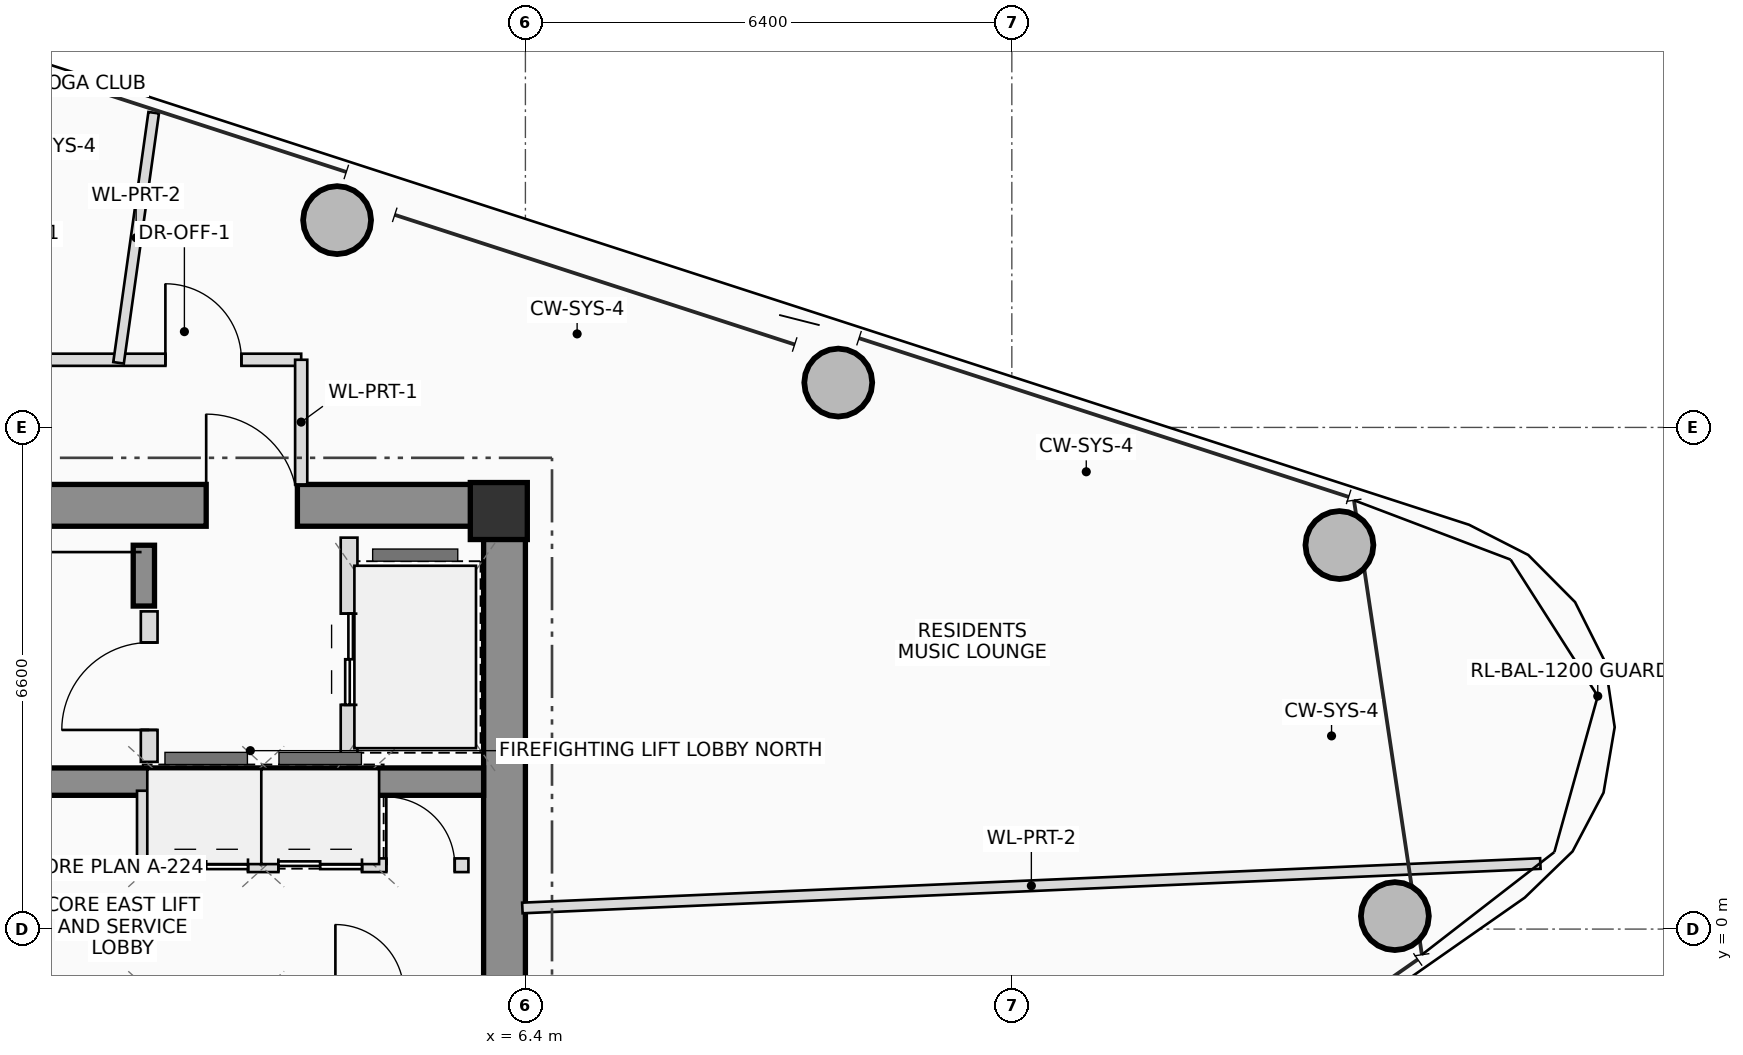
"""IFC4 building model, lengths in metres.
Left out: names, types, materials, properties, quantities, classifications, styles, units other than length and angle.
Written with IfcOpenShell. Run it as: python <this file> out.ifc"""

import sys

from ifc_helpers import new_model, si_unit, direction, frame, frame_2d, origin, origin_2d, place, context, subcontext, project, spatial, rectangle, hollow_circle, extrude, source, transform, mapped, element, fill, save


model = new_model("IFC4")
c1 = context("Model", 3, precision=1e-05, world=origin(), true_north=direction((0.0, 1.0)))
c2 = subcontext(c1, "Body", "Model", "MODEL_VIEW")
j1 = project(units=[si_unit("LENGTHUNIT", "METRE"), si_unit("PLANEANGLEUNIT", "RADIAN")], contexts=[c1])
p1 = place(None, origin())
s1 = spatial("IfcSite", under=j1, at=p1, CompositionType="ELEMENT")
p2 = place(p1, origin())
s2 = spatial("IfcBuilding", under=s1, at=p2, CompositionType="ELEMENT")
p3 = place(p2, frame((0.0, 0.0, 257.55)))
s3 = spatial("IfcBuildingStorey", under=s2, at=p3, CompositionType="ELEMENT", Elevation=257.55)
m1 = source(origin(), c2, "Body", "SweptSolid", [
    extrude(rectangle(XDim=0.75, YDim=0.75, at=origin_2d()), origin(), (0.0, 0.0, 1.0), 3.4),
])
p4 = place(p3, frame((6.05, 5.5, 0.0), z_axis=(0.0, 0.0, 1.0), x_axis=(1.0, 0.0, 0.0)))
e1 = element("IfcColumn", 1, at=p4, inside=s3, PredefinedType="COLUMN", context=c2, shape_type="MappedRepresentation", body=[
    mapped(m1, transform((0.0, 0.0, 0.0), scale=1.0)),
])
p5 = place(p3, frame((-6.4, 5.575, 0.0), z_axis=(0.0, 0.0, 1.0), x_axis=(1.0, 0.0, 0.0)))
e2 = element("IfcWall", 2, at=p5, inside=s3, PredefinedType="SHEAR", context=c2, shape_type="SweptSolid", body=[
    extrude(rectangle(XDim=12.8, YDim=0.55, at=frame_2d((6.4, 0.0))), origin(), (0.0, 0.0, 1.0), 3.4),
])
p6 = place(p5, frame((8.6, 0.0, 0.0)))
e3 = element("IfcOpeningElement", 3, at=p6, cuts=e2, PredefinedType="OPENING", context=c2, shape_type="SweptSolid", body=[
    extrude(rectangle(XDim=1.2, YDim=2.2, at=frame_2d((0.6, 1.1))), frame((0.0, 0.285, 0.0), z_axis=(0.0, -1.0, 0.0), x_axis=(1.0, 0.0, 0.0)), (0.0, 0.0, 1.0), 0.57),
])
p7 = place(p3, frame((6.125, -5.3, 0.0), z_axis=(0.0, 0.0, 1.0), x_axis=(0.0, 1.0, 0.0)))
e4 = element("IfcWall", 4, at=p7, inside=s3, PredefinedType="SHEAR", context=c2, shape_type="SweptSolid", body=[
    extrude(rectangle(XDim=10.6, YDim=0.55, at=frame_2d((5.3, 0.0))), origin(), (0.0, 0.0, 1.0), 3.4),
])
p8 = place(p3, frame((-5.85, 1.94, 0.0), z_axis=(0.0, 0.0, 1.0), x_axis=(1.0, 0.0, 0.0)))
e5 = element("IfcWall", 5, at=p8, inside=s3, PredefinedType="SHEAR", context=c2, shape_type="SweptSolid", body=[
    extrude(rectangle(XDim=11.7, YDim=0.36, at=frame_2d((5.85, 0.0))), origin(), (0.0, 0.0, 1.0), 3.4),
])
p9 = place(p3, frame((1.38, 4.25, 0.0), z_axis=(0.0, 0.0, 1.0), x_axis=(0.0, 1.0, 0.0)))
e6 = element("IfcWall", 6, at=p9, inside=s3, PredefinedType="SHEAR", context=c2, shape_type="SweptSolid", body=[
    extrude(rectangle(XDim=0.8, YDim=0.28, at=frame_2d((0.4, 0.0))), origin(), (0.0, 0.0, 1.0), 3.4),
])
m2 = source(origin(), c2, "Body", "SweptSolid", [
    extrude(hollow_circle(Radius=0.45, WallThickness=0.032, at=origin_2d()), origin(), (0.0, 0.0, 1.0), 3.4),
])
for number, where, z_axis, x_axis in (
    (7, (17.84, 0.171, 0.0), (0.0, 0.0, 1.0), (1.0, 0.0, 0.0)),
    (8, (17.11, 5.052, 0.0), (0.0, 0.0, 1.0), (1.0, 0.0, 0.0)),
    (9, (10.516, 7.19, 0.0), (0.0, 0.0, 1.0), (1.0, 0.0, 0.0)),
    (10, (3.922, 9.327, 0.0), (0.0, 0.0, 1.0), (1.0, 0.0, 0.0)),
):
    element("IfcColumn", number, at=place(p3, frame(where, z_axis=z_axis, x_axis=x_axis)), inside=s3, PredefinedType="COLUMN", context=c2, shape_type="MappedRepresentation", body=[
        mapped(m2, transform((0.0, 0.0, 0.0), scale=1.0)),
    ])
p10 = place(p3, frame((1.45, 2.2, 0.0), z_axis=(0.0, 0.0, 1.0), x_axis=(0.0, 1.0, 0.0)))
e11 = element("IfcWall", 11, at=p10, inside=s3, PredefinedType="PLUMBINGWALL", context=c2, shape_type="SweptSolid", body=[
    extrude(rectangle(XDim=1.98, YDim=0.22, at=frame_2d((0.99, 0.0))), origin(), (0.0, 0.0, 1.0), 3.2),
])
p11 = place(p10, frame((0.42, 0.0, 0.0)))
e12 = element("IfcOpeningElement", 12, at=p11, cuts=e11, PredefinedType="OPENING", context=c2, shape_type="SweptSolid", body=[
    extrude(rectangle(XDim=1.15, YDim=2.15, at=frame_2d((0.575, 1.075))), frame((0.0, 0.12, 0.0), z_axis=(0.0, -1.0, 0.0), x_axis=(1.0, 0.0, 0.0)), (0.0, 0.0, 1.0), 0.24),
])
p12 = place(p3, frame((4.08, 2.2, 0.0), z_axis=(0.0, 0.0, 1.0), x_axis=(0.0, 1.0, 0.0)))
e13 = element("IfcWall", 13, at=p12, inside=s3, PredefinedType="PLUMBINGWALL", context=c2, shape_type="SweptSolid", body=[
    extrude(rectangle(XDim=2.95, YDim=0.22, at=frame_2d((1.475, 0.0))), origin(), (0.0, 0.0, 1.0), 3.2),
])
p13 = place(p12, frame((0.75, 0.0, 0.0)))
e14 = element("IfcOpeningElement", 14, at=p13, cuts=e13, PredefinedType="OPENING", context=c2, shape_type="SweptSolid", body=[
    extrude(rectangle(XDim=1.2, YDim=2.25, at=frame_2d((0.6, 1.125))), frame((0.0, 0.12, 0.0), z_axis=(0.0, -1.0, 0.0), x_axis=(1.0, 0.0, 0.0)), (0.0, 0.0, 1.0), 0.24),
])
for number, where, z_axis, x_axis in (
    (15, (1.38, 0.84, 0.0), (0.0, 0.0, 1.0), (0.0, 1.0, 0.0)),
    (16, (3.02, 0.84, 0.0), (0.0, 0.0, 1.0), (0.0, 1.0, 0.0)),
    (17, (4.38, 0.84, 0.0), (0.0, 0.0, 1.0), (0.0, 1.0, 0.0)),
):
    element("IfcWall", number, at=place(p3, frame(where, z_axis=z_axis, x_axis=x_axis)), inside=s3, PredefinedType="PLUMBINGWALL", context=c2, shape_type="SweptSolid", body=[
        extrude(rectangle(XDim=0.98, YDim=0.18, at=frame_2d((0.49, 0.0))), origin(), (0.0, 0.0, 1.0), 3.2),
    ])
p14 = place(p3, frame((-5.68, 0.84, 0.0), z_axis=(0.0, 0.0, 1.0), x_axis=(1.0, 0.0, 0.0)))
e18 = element("IfcWall", 18, at=p14, inside=s3, PredefinedType="PLUMBINGWALL", context=c2, shape_type="SweptSolid", body=[
    extrude(rectangle(XDim=11.33, YDim=0.18, at=frame_2d((5.665, 0.0))), origin(), (0.0, 0.0, 1.0), 3.2),
])
p15 = place(p14, frame((3.13, 0.0, 0.0)))
e19 = element("IfcOpeningElement", 19, at=p15, cuts=e18, PredefinedType="OPENING", context=c2, shape_type="SweptSolid", body=[
    extrude(rectangle(XDim=0.9, YDim=2.05, at=frame_2d((0.45, 1.025))), frame((0.0, 0.1, 0.0), z_axis=(0.0, -1.0, 0.0), x_axis=(1.0, 0.0, 0.0)), (0.0, 0.0, 1.0), 0.2),
])
p16 = place(p14, frame((7.33, 0.0, 0.0)))
e20 = element("IfcOpeningElement", 20, at=p16, cuts=e18, PredefinedType="OPENING", context=c2, shape_type="SweptSolid", body=[
    extrude(rectangle(XDim=1.1, YDim=2.2, at=frame_2d((0.55, 1.1))), frame((0.0, 0.1, 0.0), z_axis=(0.0, -1.0, 0.0), x_axis=(1.0, 0.0, 0.0)), (0.0, 0.0, 1.0), 0.2),
])
p17 = place(p14, frame((8.83, 0.0, 0.0)))
e21 = element("IfcOpeningElement", 21, at=p17, cuts=e18, PredefinedType="OPENING", context=c2, shape_type="SweptSolid", body=[
    extrude(rectangle(XDim=1.1, YDim=2.2, at=frame_2d((0.55, 1.1))), frame((0.0, 0.1, 0.0), z_axis=(0.0, -1.0, 0.0), x_axis=(1.0, 0.0, 0.0)), (0.0, 0.0, 1.0), 0.2),
])
p18 = place(p14, frame((10.25, 0.0, 0.0)))
e22 = element("IfcOpeningElement", 22, at=p18, cuts=e18, PredefinedType="OPENING", context=c2, shape_type="SweptSolid", body=[
    extrude(rectangle(XDim=0.9, YDim=2.05, at=frame_2d((0.45, 1.025))), frame((0.0, 0.1, 0.0), z_axis=(0.0, -1.0, 0.0), x_axis=(1.0, 0.0, 0.0)), (0.0, 0.0, 1.0), 0.2),
])
p19 = place(p3, frame((-6.36, 7.49, 0.0), z_axis=(0.0, 0.0, 1.0), x_axis=(1.0, 0.0, 0.0)))
e23 = element("IfcWall", 23, at=p19, inside=s3, PredefinedType="PARTITIONING", context=c2, shape_type="SweptSolid", body=[
    extrude(rectangle(XDim=9.81, YDim=0.16, at=frame_2d((4.905, 0.0))), origin(), (0.0, 0.0, 1.0), 2.605),
])
p20 = place(p19, frame((5.284, 0.0, 0.0)))
e24 = element("IfcOpeningElement", 24, at=p20, cuts=e23, PredefinedType="OPENING", context=c2, shape_type="SweptSolid", body=[
    extrude(rectangle(XDim=1.0, YDim=2.25, at=frame_2d((0.5, 1.125))), frame((0.0, 0.09, 0.0), z_axis=(0.0, -1.0, 0.0), x_axis=(1.0, 0.0, 0.0)), (0.0, 0.0, 1.0), 0.18),
])
p21 = place(p19, frame((8.023, 0.0, 0.0)))
e25 = element("IfcOpeningElement", 25, at=p21, cuts=e23, PredefinedType="OPENING", context=c2, shape_type="SweptSolid", body=[
    extrude(rectangle(XDim=1.0, YDim=2.25, at=frame_2d((0.5, 1.125))), frame((0.0, 0.09, 0.0), z_axis=(0.0, -1.0, 0.0), x_axis=(1.0, 0.0, 0.0)), (0.0, 0.0, 1.0), 0.18),
])
p22 = place(p3, frame((3.45, 7.49, 0.0), z_axis=(0.0, 0.0, 1.0), x_axis=(0.0, -1.0, 0.0)))
e26 = element("IfcWall", 26, at=p22, inside=s3, PredefinedType="PARTITIONING", context=c2, shape_type="SweptSolid", body=[
    extrude(rectangle(XDim=1.64, YDim=0.16, at=frame_2d((0.82, 0.0))), origin(), (0.0, 0.0, 1.0), 2.805),
])
p23 = place(p3, frame((6.36, 0.278, 0.0), z_axis=(0.0, 0.0, 1.0), x_axis=(0.999047617824, 0.043633213494, 0.0)))
e27 = element("IfcWall", 27, at=p23, inside=s3, PredefinedType="PARTITIONING", context=c2, shape_type="SweptSolid", body=[
    extrude(rectangle(XDim=13.406, YDim=0.14, at=frame_2d((6.703, 0.0))), origin(), (0.0, 0.0, 1.0), 2.605),
])
p24 = place(p3, frame((1.047, 7.45, 0.0), z_axis=(0.0, 0.0, 1.0), x_axis=(0.13916814145, 0.990268765743, 0.0)))
e28 = element("IfcWall", 28, at=p24, inside=s3, PredefinedType="PARTITIONING", context=c2, shape_type="SweptSolid", body=[
    extrude(rectangle(XDim=3.323, YDim=0.14, at=frame_2d((1.661, 0.0))), origin(), (0.0, 0.0, 1.0), 2.765),
])
p25 = place(p6, origin())
e29 = element("IfcDoor", 29, at=p25, inside=s3, OperationType="SINGLE_SWING_LEFT", PredefinedType="DOOR", context=c2, shape_type="SweptSolid", body=[
    extrude(rectangle(XDim=1.2, YDim=2.2, at=frame_2d((0.6, 1.1))), frame((0.0, 0.025, 0.0), z_axis=(0.0, -1.0, 0.0), x_axis=(1.0, 0.0, 0.0)), (0.0, 0.0, 1.0), 0.05),
])
fill(e3, e29)
p26 = place(p11, origin())
e30 = element("IfcDoor", 30, at=p26, inside=s3, OperationType="SINGLE_SWING_LEFT", PredefinedType="DOOR", context=c2, shape_type="SweptSolid", body=[
    extrude(rectangle(XDim=1.15, YDim=2.15, at=frame_2d((0.575, 1.075))), frame((0.0, 0.025, 0.0), z_axis=(0.0, -1.0, 0.0), x_axis=(1.0, 0.0, 0.0)), (0.0, 0.0, 1.0), 0.05),
])
fill(e12, e30)
p27 = place(p13, origin())
e31 = element("IfcDoor", 31, at=p27, inside=s3, OperationType="DOUBLE_DOOR_SLIDING", PredefinedType="DOOR", context=c2, shape_type="SweptSolid", body=[
    extrude(rectangle(XDim=1.2, YDim=2.25, at=frame_2d((0.6, 1.125))), frame((0.0, 0.025, 0.0), z_axis=(0.0, -1.0, 0.0), x_axis=(1.0, 0.0, 0.0)), (0.0, 0.0, 1.0), 0.05),
])
fill(e14, e31)
p28 = place(p16, origin())
e32 = element("IfcDoor", 32, at=p28, inside=s3, OperationType="DOUBLE_DOOR_SLIDING", PredefinedType="DOOR", context=c2, shape_type="SweptSolid", body=[
    extrude(rectangle(XDim=1.1, YDim=2.2, at=frame_2d((0.55, 1.1))), frame((0.0, 0.025, 0.0), z_axis=(0.0, -1.0, 0.0), x_axis=(1.0, 0.0, 0.0)), (0.0, 0.0, 1.0), 0.05),
])
fill(e20, e32)
p29 = place(p17, origin())
e33 = element("IfcDoor", 33, at=p29, inside=s3, OperationType="DOUBLE_DOOR_SLIDING", PredefinedType="DOOR", context=c2, shape_type="SweptSolid", body=[
    extrude(rectangle(XDim=1.1, YDim=2.2, at=frame_2d((0.55, 1.1))), frame((0.0, 0.025, 0.0), z_axis=(0.0, -1.0, 0.0), x_axis=(1.0, 0.0, 0.0)), (0.0, 0.0, 1.0), 0.05),
])
fill(e21, e33)
p30 = place(p18, origin())
e34 = element("IfcDoor", 34, at=p30, inside=s3, OperationType="SINGLE_SWING_LEFT", PredefinedType="DOOR", context=c2, shape_type="SweptSolid", body=[
    extrude(rectangle(XDim=0.9, YDim=2.05, at=frame_2d((0.45, 1.025))), frame((0.0, 0.025, 0.0), z_axis=(0.0, -1.0, 0.0), x_axis=(1.0, 0.0, 0.0)), (0.0, 0.0, 1.0), 0.05),
])
fill(e22, e34)
p31 = place(p21, origin())
e35 = element("IfcDoor", 35, at=p31, inside=s3, OperationType="SINGLE_SWING_LEFT", PredefinedType="DOOR", context=c2, shape_type="SweptSolid", body=[
    extrude(rectangle(XDim=1.0, YDim=2.25, at=frame_2d((0.5, 1.125))), frame((0.0, 0.025, 0.0), z_axis=(0.0, -1.0, 0.0), x_axis=(1.0, 0.0, 0.0)), (0.0, 0.0, 1.0), 0.05),
])
fill(e25, e35)
save(model, sys.argv[1])
